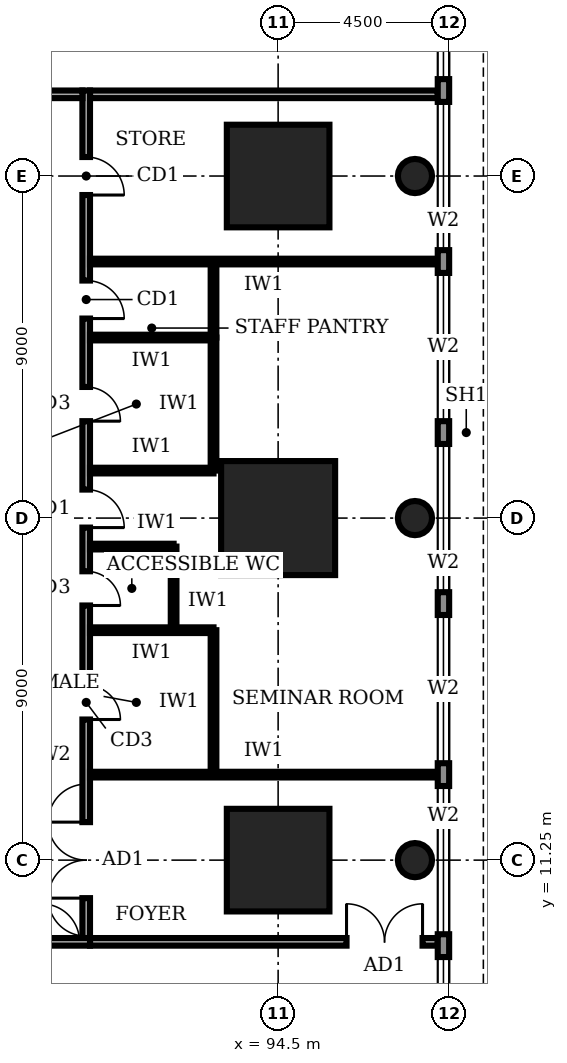
"""IFC4 building model, lengths in metres.
Left out: names, types, materials, properties, quantities, classifications, styles, units other than length and angle.
Written with IfcOpenShell. Run it as: python <this file> out.ifc"""

import sys

from ifc_helpers import new_model, si_unit, direction, frame, frame_2d, origin, origin_2d, place, context, subcontext, project, spatial, rectangle, circle, extrude, element, fill, save


model = new_model("IFC4")
c1 = context("Model", 3, precision=1e-05, world=origin(), true_north=direction((0.0, 1.0)))
c2 = subcontext(c1, "Body", "Model", "MODEL_VIEW")
j1 = project(units=[si_unit("LENGTHUNIT", "METRE"), si_unit("PLANEANGLEUNIT", "RADIAN")], contexts=[c1])
p1 = place(None, origin())
s1 = spatial("IfcSite", under=j1, at=p1, CompositionType="ELEMENT")
p2 = place(p1, origin())
s2 = spatial("IfcBuilding", under=s1, at=p2, CompositionType="ELEMENT")
p3 = place(p2, frame((0.0, 0.0, 6.0)))
s3 = spatial("IfcBuildingStorey", under=s2, at=p3, CompositionType="ELEMENT", Elevation=6.0)
p4 = place(p3, frame((94.5, 11.25, 0.0), z_axis=(0.0, 0.0, 1.0), x_axis=(1.0, 0.0, 0.0)))
e1 = element("IfcColumn", 1, at=p4, inside=s3, PredefinedType="COLUMN", context=c2, shape_type="SweptSolid", body=[
    extrude(rectangle(XDim=2.7, YDim=2.7, at=origin_2d()), origin(), (0.0, 0.0, 1.0), 5.0),
])
p5 = place(p3, frame((94.5, 20.25, 0.0), z_axis=(0.0, 0.0, 1.0), x_axis=(1.0, 0.0, 0.0)))
e2 = element("IfcColumn", 2, at=p5, inside=s3, PredefinedType="COLUMN", context=c2, shape_type="SweptSolid", body=[
    extrude(rectangle(XDim=3.0, YDim=3.0, at=origin_2d()), origin(), (0.0, 0.0, 1.0), 5.0),
])
p6 = place(p3, frame((94.5, 29.25, 0.0), z_axis=(0.0, 0.0, 1.0), x_axis=(1.0, 0.0, 0.0)))
e3 = element("IfcColumn", 3, at=p6, inside=s3, PredefinedType="COLUMN", context=c2, shape_type="SweptSolid", body=[
    extrude(rectangle(XDim=2.7, YDim=2.7, at=origin_2d()), origin(), (0.0, 0.0, 1.0), 5.0),
])
for number, where, z_axis, x_axis in (
    (4, (98.1, 11.25, 0.0), (0.0, 0.0, 1.0), (1.0, 0.0, 0.0)),
    (5, (98.1, 20.25, 0.0), (0.0, 0.0, 1.0), (1.0, 0.0, 0.0)),
    (6, (98.1, 29.25, 0.0), (0.0, 0.0, 1.0), (1.0, 0.0, 0.0)),
):
    element("IfcColumn", number, at=place(p3, frame(where, z_axis=z_axis, x_axis=x_axis)), inside=s3, PredefinedType="COLUMN", context=c2, shape_type="SweptSolid", body=[
        extrude(circle(Radius=0.45, at=origin_2d()), origin(), (0.0, 0.0, 1.0), 5.0),
    ])
p7 = place(p3, frame((98.85, -4.48, 0.0), z_axis=(0.0, 0.0, 1.0), x_axis=(0.0, 1.0, 0.0)))
e7 = element("IfcWall", 7, at=p7, inside=s3, PredefinedType="STANDARD", context=c2, shape_type="SweptSolid", body=[
    extrude(rectangle(XDim=53.96, YDim=0.3, at=frame_2d((26.98, 0.0))), origin(), (0.0, 0.0, 1.0), 4.7),
])
p8 = place(p7, frame((4.78, 0.0, 0.6)))
e8 = element("IfcOpeningElement", 8, at=p8, cuts=e7, PredefinedType="OPENING", context=c2, shape_type="SweptSolid", body=[
    extrude(rectangle(XDim=3.9, YDim=2.6, at=frame_2d((1.95, 1.3))), frame((0.0, 0.16, 0.0), z_axis=(0.0, -1.0, 0.0), x_axis=(1.0, 0.0, 0.0)), (0.0, 0.0, 1.0), 0.32),
])
p9 = place(p7, frame((9.28, 0.0, 0.6)))
e9 = element("IfcOpeningElement", 9, at=p9, cuts=e7, PredefinedType="OPENING", context=c2, shape_type="SweptSolid", body=[
    extrude(rectangle(XDim=3.9, YDim=2.6, at=frame_2d((1.95, 1.3))), frame((0.0, 0.16, 0.0), z_axis=(0.0, -1.0, 0.0), x_axis=(1.0, 0.0, 0.0)), (0.0, 0.0, 1.0), 0.32),
])
p10 = place(p7, frame((13.78, 0.0, 0.6)))
e10 = element("IfcOpeningElement", 10, at=p10, cuts=e7, PredefinedType="OPENING", context=c2, shape_type="SweptSolid", body=[
    extrude(rectangle(XDim=3.9, YDim=2.6, at=frame_2d((1.95, 1.3))), frame((0.0, 0.16, 0.0), z_axis=(0.0, -1.0, 0.0), x_axis=(1.0, 0.0, 0.0)), (0.0, 0.0, 1.0), 0.32),
])
p11 = place(p7, frame((18.28, 0.0, 0.6)))
e11 = element("IfcOpeningElement", 11, at=p11, cuts=e7, PredefinedType="OPENING", context=c2, shape_type="SweptSolid", body=[
    extrude(rectangle(XDim=3.9, YDim=2.6, at=frame_2d((1.95, 1.3))), frame((0.0, 0.16, 0.0), z_axis=(0.0, -1.0, 0.0), x_axis=(1.0, 0.0, 0.0)), (0.0, 0.0, 1.0), 0.32),
])
p12 = place(p7, frame((22.78, 0.0, 0.6)))
e12 = element("IfcOpeningElement", 12, at=p12, cuts=e7, PredefinedType="OPENING", context=c2, shape_type="SweptSolid", body=[
    extrude(rectangle(XDim=3.9, YDim=2.6, at=frame_2d((1.95, 1.3))), frame((0.0, 0.16, 0.0), z_axis=(0.0, -1.0, 0.0), x_axis=(1.0, 0.0, 0.0)), (0.0, 0.0, 1.0), 0.32),
])
p13 = place(p7, frame((27.28, 0.0, 0.6)))
e13 = element("IfcOpeningElement", 13, at=p13, cuts=e7, PredefinedType="OPENING", context=c2, shape_type="SweptSolid", body=[
    extrude(rectangle(XDim=3.9, YDim=2.6, at=frame_2d((1.95, 1.3))), frame((0.0, 0.16, 0.0), z_axis=(0.0, -1.0, 0.0), x_axis=(1.0, 0.0, 0.0)), (0.0, 0.0, 1.0), 0.32),
])
p14 = place(p7, frame((31.78, 0.0, 0.6)))
e14 = element("IfcOpeningElement", 14, at=p14, cuts=e7, PredefinedType="OPENING", context=c2, shape_type="SweptSolid", body=[
    extrude(rectangle(XDim=3.9, YDim=2.6, at=frame_2d((1.95, 1.3))), frame((0.0, 0.16, 0.0), z_axis=(0.0, -1.0, 0.0), x_axis=(1.0, 0.0, 0.0)), (0.0, 0.0, 1.0), 0.32),
])
p15 = place(p7, frame((36.28, 0.0, 0.6)))
e15 = element("IfcOpeningElement", 15, at=p15, cuts=e7, PredefinedType="OPENING", context=c2, shape_type="SweptSolid", body=[
    extrude(rectangle(XDim=3.9, YDim=2.6, at=frame_2d((1.95, 1.3))), frame((0.0, 0.16, 0.0), z_axis=(0.0, -1.0, 0.0), x_axis=(1.0, 0.0, 0.0)), (0.0, 0.0, 1.0), 0.32),
])
p16 = place(p7, frame((40.78, 0.0, 0.6)))
e16 = element("IfcOpeningElement", 16, at=p16, cuts=e7, PredefinedType="OPENING", context=c2, shape_type="SweptSolid", body=[
    extrude(rectangle(XDim=3.9, YDim=2.6, at=frame_2d((1.95, 1.3))), frame((0.0, 0.16, 0.0), z_axis=(0.0, -1.0, 0.0), x_axis=(1.0, 0.0, 0.0)), (0.0, 0.0, 1.0), 0.32),
])
p17 = place(p7, frame((45.28, 0.0, 0.6)))
e17 = element("IfcOpeningElement", 17, at=p17, cuts=e7, PredefinedType="OPENING", context=c2, shape_type="SweptSolid", body=[
    extrude(rectangle(XDim=3.9, YDim=2.6, at=frame_2d((1.95, 1.3))), frame((0.0, 0.16, 0.0), z_axis=(0.0, -1.0, 0.0), x_axis=(1.0, 0.0, 0.0)), (0.0, 0.0, 1.0), 0.32),
])
p18 = place(p7, frame((49.78, 0.0, 0.6)))
e18 = element("IfcOpeningElement", 18, at=p18, cuts=e7, PredefinedType="OPENING", context=c2, shape_type="SweptSolid", body=[
    extrude(rectangle(XDim=3.9, YDim=2.6, at=frame_2d((1.95, 1.3))), frame((0.0, 0.16, 0.0), z_axis=(0.0, -1.0, 0.0), x_axis=(1.0, 0.0, 0.0)), (0.0, 0.0, 1.0), 0.32),
])
p19 = place(p3, frame((72.65, 9.1, 0.0), z_axis=(0.0, 0.0, 1.0), x_axis=(1.0, 0.0, 0.0)))
e19 = element("IfcWall", 19, at=p19, inside=s3, PredefinedType="SOLIDWALL", context=c2, shape_type="SweptSolid", body=[
    extrude(rectangle(XDim=16.9, YDim=0.2, at=frame_2d((8.45, 0.0))), origin(), (0.0, 0.0, 1.0), 4.7),
])
p20 = place(p19, frame((0.975, 0.0, 0.0)))
e20 = element("IfcOpeningElement", 20, at=p20, cuts=e19, PredefinedType="OPENING", context=c2, shape_type="SweptSolid", body=[
    extrude(rectangle(XDim=1.8, YDim=2.1, at=frame_2d((0.9, 1.05))), frame((0.0, 0.11, 0.0), z_axis=(0.0, -1.0, 0.0), x_axis=(1.0, 0.0, 0.0)), (0.0, 0.0, 1.0), 0.22),
])
p21 = place(p19, frame((7.35, 0.0, 0.0)))
e21 = element("IfcOpeningElement", 21, at=p21, cuts=e19, PredefinedType="OPENING", context=c2, shape_type="SweptSolid", body=[
    extrude(rectangle(XDim=2.0, YDim=2.4, at=frame_2d((1.0, 1.2))), frame((0.0, 0.11, 0.0), z_axis=(0.0, -1.0, 0.0), x_axis=(1.0, 0.0, 0.0)), (0.0, 0.0, 1.0), 0.22),
])
p22 = place(p19, frame((13.625, 0.0, 0.0)))
e22 = element("IfcOpeningElement", 22, at=p22, cuts=e19, PredefinedType="OPENING", context=c2, shape_type="SweptSolid", body=[
    extrude(rectangle(XDim=2.0, YDim=2.4, at=frame_2d((1.0, 1.2))), frame((0.0, 0.11, 0.0), z_axis=(0.0, -1.0, 0.0), x_axis=(1.0, 0.0, 0.0)), (0.0, 0.0, 1.0), 0.22),
])
p23 = place(p3, frame((89.45, 9.2, 0.0), z_axis=(0.0, 0.0, 1.0), x_axis=(0.0, 1.0, 0.0)))
e23 = element("IfcWall", 23, at=p23, inside=s3, PredefinedType="SOLIDWALL", context=c2, shape_type="SweptSolid", body=[
    extrude(rectangle(XDim=22.3, YDim=0.2, at=frame_2d((11.15, 0.0))), origin(), (0.0, 0.0, 1.0), 4.7),
])
p24 = place(p23, frame((1.05, 0.0, 0.0)))
e24 = element("IfcOpeningElement", 24, at=p24, cuts=e23, PredefinedType="OPENING", context=c2, shape_type="SweptSolid", body=[
    extrude(rectangle(XDim=2.0, YDim=2.4, at=frame_2d((1.0, 1.2))), frame((0.0, 0.11, 0.0), z_axis=(0.0, -1.0, 0.0), x_axis=(1.0, 0.0, 0.0)), (0.0, 0.0, 1.0), 0.22),
])
p25 = place(p23, frame((5.75, 0.0, 0.0)))
e25 = element("IfcOpeningElement", 25, at=p25, cuts=e23, PredefinedType="OPENING", context=c2, shape_type="SweptSolid", body=[
    extrude(rectangle(XDim=0.9, YDim=2.1, at=frame_2d((0.45, 1.05))), frame((0.0, 0.11, 0.0), z_axis=(0.0, -1.0, 0.0), x_axis=(1.0, 0.0, 0.0)), (0.0, 0.0, 1.0), 0.22),
])
p26 = place(p23, frame((8.75, 0.0, 0.0)))
e26 = element("IfcOpeningElement", 26, at=p26, cuts=e23, PredefinedType="OPENING", context=c2, shape_type="SweptSolid", body=[
    extrude(rectangle(XDim=0.9, YDim=2.1, at=frame_2d((0.45, 1.05))), frame((0.0, 0.11, 0.0), z_axis=(0.0, -1.0, 0.0), x_axis=(1.0, 0.0, 0.0)), (0.0, 0.0, 1.0), 0.22),
])
p27 = place(p23, frame((13.6, 0.0, 0.0)))
e27 = element("IfcOpeningElement", 27, at=p27, cuts=e23, PredefinedType="OPENING", context=c2, shape_type="SweptSolid", body=[
    extrude(rectangle(XDim=0.9, YDim=2.1, at=frame_2d((0.45, 1.05))), frame((0.0, 0.11, 0.0), z_axis=(0.0, -1.0, 0.0), x_axis=(1.0, 0.0, 0.0)), (0.0, 0.0, 1.0), 0.22),
])
p28 = place(p23, frame((16.3, 0.0, 0.0)))
e28 = element("IfcOpeningElement", 28, at=p28, cuts=e23, PredefinedType="OPENING", context=c2, shape_type="SweptSolid", body=[
    extrude(rectangle(XDim=1.0, YDim=2.1, at=frame_2d((0.5, 1.05))), frame((0.0, 0.11, 0.0), z_axis=(0.0, -1.0, 0.0), x_axis=(1.0, 0.0, 0.0)), (0.0, 0.0, 1.0), 0.22),
])
p29 = place(p23, frame((10.8, 0.0, 0.0)))
e29 = element("IfcOpeningElement", 29, at=p29, cuts=e23, PredefinedType="OPENING", context=c2, shape_type="SweptSolid", body=[
    extrude(rectangle(XDim=1.0, YDim=2.1, at=frame_2d((0.5, 1.05))), frame((0.0, 0.11, 0.0), z_axis=(0.0, -1.0, 0.0), x_axis=(1.0, 0.0, 0.0)), (0.0, 0.0, 1.0), 0.22),
])
p30 = place(p23, frame((19.55, 0.0, 0.0)))
e30 = element("IfcOpeningElement", 30, at=p30, cuts=e23, PredefinedType="OPENING", context=c2, shape_type="SweptSolid", body=[
    extrude(rectangle(XDim=1.0, YDim=2.1, at=frame_2d((0.5, 1.05))), frame((0.0, 0.11, 0.0), z_axis=(0.0, -1.0, 0.0), x_axis=(1.0, 0.0, 0.0)), (0.0, 0.0, 1.0), 0.22),
])
p31 = place(p3, frame((89.35, 31.4, 0.0), z_axis=(0.0, 0.0, 1.0), x_axis=(-1.0, 0.0, 0.0)))
e31 = element("IfcWall", 31, at=p31, inside=s3, PredefinedType="SOLIDWALL", context=c2, shape_type="SweptSolid", body=[
    extrude(rectangle(XDim=16.9, YDim=0.2, at=frame_2d((8.45, 0.0))), origin(), (0.0, 0.0, 1.0), 4.7),
])
p32 = place(p31, frame((13.925, 0.0, 0.0)))
e32 = element("IfcOpeningElement", 32, at=p32, cuts=e31, PredefinedType="OPENING", context=c2, shape_type="SweptSolid", body=[
    extrude(rectangle(XDim=1.8, YDim=2.1, at=frame_2d((0.9, 1.05))), frame((0.0, 0.11, 0.0), z_axis=(0.0, -1.0, 0.0), x_axis=(1.0, 0.0, 0.0)), (0.0, 0.0, 1.0), 0.22),
])
p33 = place(p31, frame((9.6, 0.0, 0.0)))
e33 = element("IfcOpeningElement", 33, at=p33, cuts=e31, PredefinedType="OPENING", context=c2, shape_type="SweptSolid", body=[
    extrude(rectangle(XDim=2.0, YDim=2.4, at=frame_2d((1.0, 1.2))), frame((0.0, 0.11, 0.0), z_axis=(0.0, -1.0, 0.0), x_axis=(1.0, 0.0, 0.0)), (0.0, 0.0, 1.0), 0.22),
])
p34 = place(p31, frame((5.6, 0.0, 0.0)))
e34 = element("IfcOpeningElement", 34, at=p34, cuts=e31, PredefinedType="OPENING", context=c2, shape_type="SweptSolid", body=[
    extrude(rectangle(XDim=1.0, YDim=2.1, at=frame_2d((0.5, 1.05))), frame((0.0, 0.11, 0.0), z_axis=(0.0, -1.0, 0.0), x_axis=(1.0, 0.0, 0.0)), (0.0, 0.0, 1.0), 0.22),
])
p35 = place(p31, frame((0.925, 0.0, 0.0)))
e35 = element("IfcOpeningElement", 35, at=p35, cuts=e31, PredefinedType="OPENING", context=c2, shape_type="SweptSolid", body=[
    extrude(rectangle(XDim=1.8, YDim=2.1, at=frame_2d((0.9, 1.05))), frame((0.0, 0.11, 0.0), z_axis=(0.0, -1.0, 0.0), x_axis=(1.0, 0.0, 0.0)), (0.0, 0.0, 1.0), 0.22),
])
p36 = place(p3, frame((89.55, 9.1, 0.0), z_axis=(0.0, 0.0, 1.0), x_axis=(1.0, 0.0, 0.0)))
e36 = element("IfcWall", 36, at=p36, inside=s3, PredefinedType="SOLIDWALL", context=c2, shape_type="SweptSolid", body=[
    extrude(rectangle(XDim=9.15, YDim=0.2, at=frame_2d((4.575, 0.0))), origin(), (0.0, 0.0, 1.0), 4.7),
])
p37 = place(p36, frame((6.75, 0.0, 0.0)))
e37 = element("IfcOpeningElement", 37, at=p37, cuts=e36, PredefinedType="OPENING", context=c2, shape_type="SweptSolid", body=[
    extrude(rectangle(XDim=2.0, YDim=2.4, at=frame_2d((1.0, 1.2))), frame((0.0, 0.11, 0.0), z_axis=(0.0, -1.0, 0.0), x_axis=(1.0, 0.0, 0.0)), (0.0, 0.0, 1.0), 0.22),
])
p38 = place(p3, frame((89.55, 31.4, 0.0), z_axis=(0.0, 0.0, 1.0), x_axis=(1.0, 0.0, 0.0)))
e38 = element("IfcWall", 38, at=p38, inside=s3, PredefinedType="SOLIDWALL", context=c2, shape_type="SweptSolid", body=[
    extrude(rectangle(XDim=9.15, YDim=0.2, at=frame_2d((4.575, 0.0))), origin(), (0.0, 0.0, 1.0), 4.7),
])
for number, where, z_axis, x_axis in (
    (39, (89.55, 13.5, 0.0), (0.0, 0.0, 1.0), (1.0, 0.0, 0.0)),
    (40, (89.55, 27.0, 0.0), (0.0, 0.0, 1.0), (1.0, 0.0, 0.0)),
):
    element("IfcWall", number, at=place(p3, frame(where, z_axis=z_axis, x_axis=x_axis)), inside=s3, PredefinedType="PARTITIONING", context=c2, shape_type="SweptSolid", body=[
        extrude(rectangle(XDim=9.15, YDim=0.15, at=frame_2d((4.575, 0.0))), origin(), (0.0, 0.0, 1.0), 4.7),
    ])
p39 = place(p3, frame((89.55, 17.3, 0.0), z_axis=(0.0, 0.0, 1.0), x_axis=(1.0, 0.0, 0.0)))
e41 = element("IfcWall", 41, at=p39, inside=s3, PredefinedType="PARTITIONING", context=c2, shape_type="SweptSolid", body=[
    extrude(rectangle(XDim=3.25, YDim=0.15, at=frame_2d((1.625, 0.0))), origin(), (0.0, 0.0, 1.0), 4.7),
])
p40 = place(p3, frame((89.55, 19.5, 0.0), z_axis=(0.0, 0.0, 1.0), x_axis=(1.0, 0.0, 0.0)))
e42 = element("IfcWall", 42, at=p40, inside=s3, PredefinedType="PARTITIONING", context=c2, shape_type="SweptSolid", body=[
    extrude(rectangle(XDim=2.2, YDim=0.15, at=frame_2d((1.1, 0.0))), origin(), (0.0, 0.0, 1.0), 4.7),
])
for number, where, z_axis, x_axis in (
    (43, (89.55, 21.5, 0.0), (0.0, 0.0, 1.0), (1.0, 0.0, 0.0)),
    (44, (89.55, 25.0, 0.0), (0.0, 0.0, 1.0), (1.0, 0.0, 0.0)),
):
    element("IfcWall", number, at=place(p3, frame(where, z_axis=z_axis, x_axis=x_axis)), inside=s3, PredefinedType="PARTITIONING", context=c2, shape_type="SweptSolid", body=[
        extrude(rectangle(XDim=3.25, YDim=0.15, at=frame_2d((1.625, 0.0))), origin(), (0.0, 0.0, 1.0), 4.7),
    ])
p41 = place(p3, frame((92.8, 13.5, 0.0), z_axis=(0.0, 0.0, 1.0), x_axis=(0.0, 1.0, 0.0)))
e45 = element("IfcWall", 45, at=p41, inside=s3, PredefinedType="PARTITIONING", context=c2, shape_type="SweptSolid", body=[
    extrude(rectangle(XDim=3.8, YDim=0.15, at=frame_2d((1.9, 0.0))), origin(), (0.0, 0.0, 1.0), 4.7),
])
p42 = place(p3, frame((91.75, 17.3, 0.0), z_axis=(0.0, 0.0, 1.0), x_axis=(0.0, 1.0, 0.0)))
e46 = element("IfcWall", 46, at=p42, inside=s3, PredefinedType="PARTITIONING", context=c2, shape_type="SweptSolid", body=[
    extrude(rectangle(XDim=2.2, YDim=0.15, at=frame_2d((1.1, 0.0))), origin(), (0.0, 0.0, 1.0), 4.7),
])
p43 = place(p3, frame((92.8, 21.5, 0.0), z_axis=(0.0, 0.0, 1.0), x_axis=(0.0, 1.0, 0.0)))
e47 = element("IfcWall", 47, at=p43, inside=s3, PredefinedType="PARTITIONING", context=c2, shape_type="SweptSolid", body=[
    extrude(rectangle(XDim=3.5, YDim=0.15, at=frame_2d((1.75, 0.0))), origin(), (0.0, 0.0, 1.0), 4.7),
])
p44 = place(p3, frame((92.8, 25.0, 0.0), z_axis=(0.0, 0.0, 1.0), x_axis=(0.0, 1.0, 0.0)))
e48 = element("IfcWall", 48, at=p44, inside=s3, PredefinedType="PARTITIONING", context=c2, shape_type="SweptSolid", body=[
    extrude(rectangle(XDim=2.0, YDim=0.15, at=frame_2d((1.0, 0.0))), origin(), (0.0, 0.0, 1.0), 4.7),
])
p45 = place(p9, origin())
e49 = element("IfcWindow", 49, at=p45, inside=s3, PartitioningType="SINGLE_PANEL", PredefinedType="WINDOW", context=c2, shape_type="SweptSolid", body=[
    extrude(rectangle(XDim=3.9, YDim=2.6, at=frame_2d((1.95, 1.3))), frame((0.0, 0.03, 0.0), z_axis=(0.0, -1.0, 0.0), x_axis=(1.0, 0.0, 0.0)), (0.0, 0.0, 1.0), 0.06),
])
fill(e9, e49)
p46 = place(p10, origin())
e50 = element("IfcWindow", 50, at=p46, inside=s3, PartitioningType="SINGLE_PANEL", PredefinedType="WINDOW", context=c2, shape_type="SweptSolid", body=[
    extrude(rectangle(XDim=3.9, YDim=2.6, at=frame_2d((1.95, 1.3))), frame((0.0, 0.03, 0.0), z_axis=(0.0, -1.0, 0.0), x_axis=(1.0, 0.0, 0.0)), (0.0, 0.0, 1.0), 0.06),
])
fill(e10, e50)
p47 = place(p11, origin())
e51 = element("IfcWindow", 51, at=p47, inside=s3, PartitioningType="SINGLE_PANEL", PredefinedType="WINDOW", context=c2, shape_type="SweptSolid", body=[
    extrude(rectangle(XDim=3.9, YDim=2.6, at=frame_2d((1.95, 1.3))), frame((0.0, 0.03, 0.0), z_axis=(0.0, -1.0, 0.0), x_axis=(1.0, 0.0, 0.0)), (0.0, 0.0, 1.0), 0.06),
])
fill(e11, e51)
p48 = place(p12, origin())
e52 = element("IfcWindow", 52, at=p48, inside=s3, PartitioningType="SINGLE_PANEL", PredefinedType="WINDOW", context=c2, shape_type="SweptSolid", body=[
    extrude(rectangle(XDim=3.9, YDim=2.6, at=frame_2d((1.95, 1.3))), frame((0.0, 0.03, 0.0), z_axis=(0.0, -1.0, 0.0), x_axis=(1.0, 0.0, 0.0)), (0.0, 0.0, 1.0), 0.06),
])
fill(e12, e52)
p49 = place(p13, origin())
e53 = element("IfcWindow", 53, at=p49, inside=s3, PartitioningType="SINGLE_PANEL", PredefinedType="WINDOW", context=c2, shape_type="SweptSolid", body=[
    extrude(rectangle(XDim=3.9, YDim=2.6, at=frame_2d((1.95, 1.3))), frame((0.0, 0.03, 0.0), z_axis=(0.0, -1.0, 0.0), x_axis=(1.0, 0.0, 0.0)), (0.0, 0.0, 1.0), 0.06),
])
fill(e13, e53)
p50 = place(p14, origin())
e54 = element("IfcWindow", 54, at=p50, inside=s3, PartitioningType="SINGLE_PANEL", PredefinedType="WINDOW", context=c2, shape_type="SweptSolid", body=[
    extrude(rectangle(XDim=3.9, YDim=2.6, at=frame_2d((1.95, 1.3))), frame((0.0, 0.03, 0.0), z_axis=(0.0, -1.0, 0.0), x_axis=(1.0, 0.0, 0.0)), (0.0, 0.0, 1.0), 0.06),
])
fill(e14, e54)
p51 = place(p15, origin())
e55 = element("IfcWindow", 55, at=p51, inside=s3, PartitioningType="SINGLE_PANEL", PredefinedType="WINDOW", context=c2, shape_type="SweptSolid", body=[
    extrude(rectangle(XDim=3.9, YDim=2.6, at=frame_2d((1.95, 1.3))), frame((0.0, 0.03, 0.0), z_axis=(0.0, -1.0, 0.0), x_axis=(1.0, 0.0, 0.0)), (0.0, 0.0, 1.0), 0.06),
])
fill(e15, e55)
p52 = place(p24, origin())
e56 = element("IfcDoor", 56, at=p52, inside=s3, OperationType="DOUBLE_DOOR_SINGLE_SWING", PredefinedType="DOOR", context=c2, shape_type="SweptSolid", body=[
    extrude(rectangle(XDim=2.0, YDim=2.4, at=frame_2d((1.0, 1.2))), frame((0.0, 0.025, 0.0), z_axis=(0.0, -1.0, 0.0), x_axis=(1.0, 0.0, 0.0)), (0.0, 0.0, 1.0), 0.05),
])
fill(e24, e56)
p53 = place(p25, frame((0.9, 0.0, 0.0), z_axis=(0.0, 0.0, 1.0), x_axis=(-1.0, 0.0, 0.0)))
e57 = element("IfcDoor", 57, at=p53, inside=s3, OperationType="SINGLE_SWING_RIGHT", PredefinedType="DOOR", context=c2, shape_type="SweptSolid", body=[
    extrude(rectangle(XDim=0.9, YDim=2.1, at=frame_2d((0.45, 1.05))), frame((0.0, 0.025, 0.0), z_axis=(0.0, -1.0, 0.0), x_axis=(1.0, 0.0, 0.0)), (0.0, 0.0, 1.0), 0.05),
])
fill(e25, e57)
p54 = place(p26, frame((0.9, 0.0, 0.0), z_axis=(0.0, 0.0, 1.0), x_axis=(-1.0, 0.0, 0.0)))
e58 = element("IfcDoor", 58, at=p54, inside=s3, OperationType="SINGLE_SWING_RIGHT", PredefinedType="DOOR", context=c2, shape_type="SweptSolid", body=[
    extrude(rectangle(XDim=0.9, YDim=2.1, at=frame_2d((0.45, 1.05))), frame((0.0, 0.025, 0.0), z_axis=(0.0, -1.0, 0.0), x_axis=(1.0, 0.0, 0.0)), (0.0, 0.0, 1.0), 0.05),
])
fill(e26, e58)
p55 = place(p27, frame((0.9, 0.0, 0.0), z_axis=(0.0, 0.0, 1.0), x_axis=(-1.0, 0.0, 0.0)))
e59 = element("IfcDoor", 59, at=p55, inside=s3, OperationType="SINGLE_SWING_RIGHT", PredefinedType="DOOR", context=c2, shape_type="SweptSolid", body=[
    extrude(rectangle(XDim=0.9, YDim=2.1, at=frame_2d((0.45, 1.05))), frame((0.0, 0.025, 0.0), z_axis=(0.0, -1.0, 0.0), x_axis=(1.0, 0.0, 0.0)), (0.0, 0.0, 1.0), 0.05),
])
fill(e27, e59)
p56 = place(p28, frame((1.0, 0.0, 0.0), z_axis=(0.0, 0.0, 1.0), x_axis=(-1.0, 0.0, 0.0)))
e60 = element("IfcDoor", 60, at=p56, inside=s3, OperationType="SINGLE_SWING_RIGHT", PredefinedType="DOOR", context=c2, shape_type="SweptSolid", body=[
    extrude(rectangle(XDim=1.0, YDim=2.1, at=frame_2d((0.5, 1.05))), frame((0.0, 0.025, 0.0), z_axis=(0.0, -1.0, 0.0), x_axis=(1.0, 0.0, 0.0)), (0.0, 0.0, 1.0), 0.05),
])
fill(e28, e60)
p57 = place(p29, frame((1.0, 0.0, 0.0), z_axis=(0.0, 0.0, 1.0), x_axis=(-1.0, 0.0, 0.0)))
e61 = element("IfcDoor", 61, at=p57, inside=s3, OperationType="SINGLE_SWING_RIGHT", PredefinedType="DOOR", context=c2, shape_type="SweptSolid", body=[
    extrude(rectangle(XDim=1.0, YDim=2.1, at=frame_2d((0.5, 1.05))), frame((0.0, 0.025, 0.0), z_axis=(0.0, -1.0, 0.0), x_axis=(1.0, 0.0, 0.0)), (0.0, 0.0, 1.0), 0.05),
])
fill(e29, e61)
p58 = place(p30, frame((1.0, 0.0, 0.0), z_axis=(0.0, 0.0, 1.0), x_axis=(-1.0, 0.0, 0.0)))
e62 = element("IfcDoor", 62, at=p58, inside=s3, OperationType="SINGLE_SWING_RIGHT", PredefinedType="DOOR", context=c2, shape_type="SweptSolid", body=[
    extrude(rectangle(XDim=1.0, YDim=2.1, at=frame_2d((0.5, 1.05))), frame((0.0, 0.025, 0.0), z_axis=(0.0, -1.0, 0.0), x_axis=(1.0, 0.0, 0.0)), (0.0, 0.0, 1.0), 0.05),
])
fill(e30, e62)
p59 = place(p37, origin())
e63 = element("IfcDoor", 63, at=p59, inside=s3, OperationType="DOUBLE_DOOR_SINGLE_SWING", PredefinedType="DOOR", context=c2, shape_type="SweptSolid", body=[
    extrude(rectangle(XDim=2.0, YDim=2.4, at=frame_2d((1.0, 1.2))), frame((0.0, 0.025, 0.0), z_axis=(0.0, -1.0, 0.0), x_axis=(1.0, 0.0, 0.0)), (0.0, 0.0, 1.0), 0.05),
])
fill(e37, e63)
save(model, sys.argv[1])
